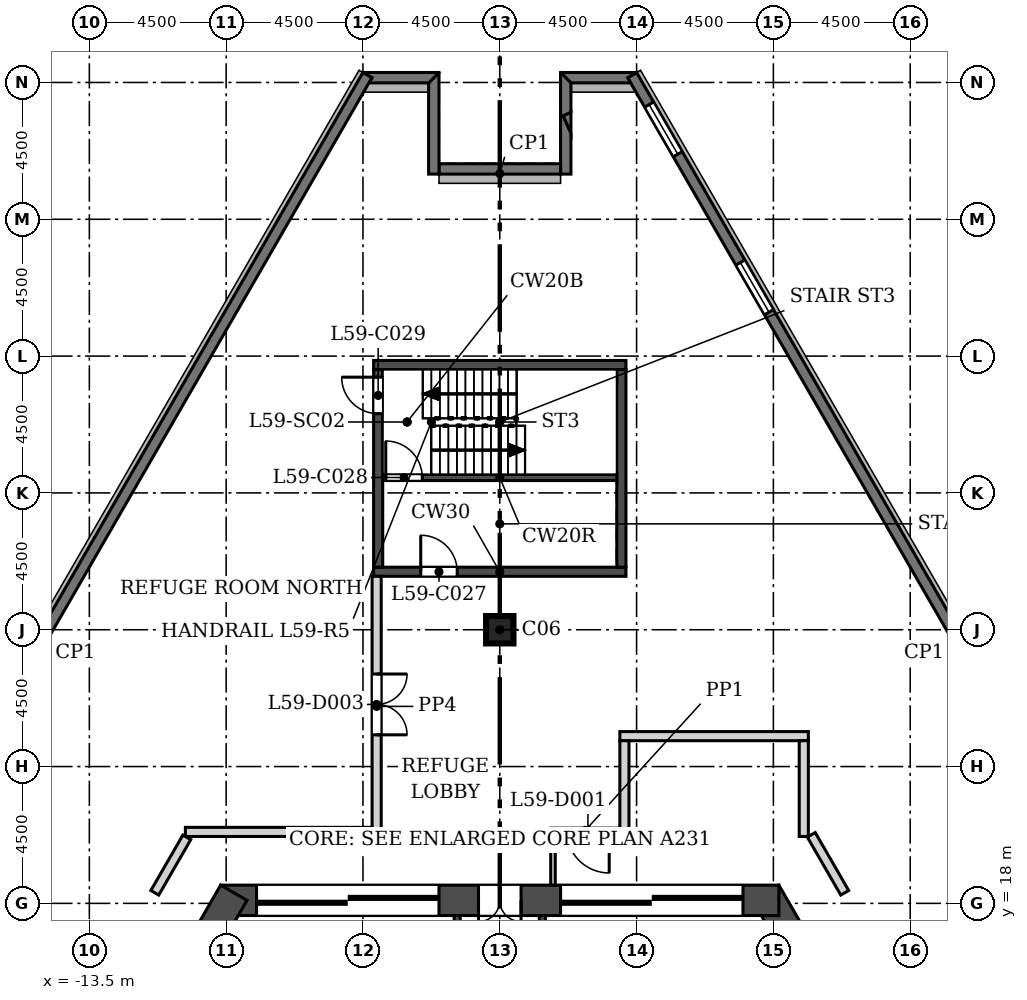
"""IFC4 building model, lengths in metres.
Left out: names, types, materials, properties, quantities, classifications, styles, units other than length and angle.
Written with IfcOpenShell. Run it as: python <this file> out.ifc"""

import sys

from ifc_helpers import new_model, si_unit, direction, frame, frame_2d, origin, origin_2d, place, context, subcontext, project, spatial, polyline, rectangle, outline, extrude, element, fill, save


model = new_model("IFC4")
c1 = context("Model", 3, precision=1e-05, world=origin(), true_north=direction((0.0, 1.0)))
c2 = subcontext(c1, "Body", "Model", "MODEL_VIEW")
j1 = project(units=[si_unit("LENGTHUNIT", "METRE"), si_unit("PLANEANGLEUNIT", "RADIAN")], contexts=[c1])
p1 = place(None, origin())
s1 = spatial("IfcSite", under=j1, at=p1, CompositionType="ELEMENT")
p2 = place(p1, origin())
s2 = spatial("IfcBuilding", under=s1, at=p2, CompositionType="ELEMENT")
p3 = place(p2, frame((0.0, 0.0, 259.5)))
s3 = spatial("IfcBuildingStorey", under=s2, at=p3, CompositionType="ELEMENT", Elevation=259.5)
p4 = place(p3, frame((0.0, 27.0, 0.0), z_axis=(0.0, 0.0, 1.0), x_axis=(1.0, 0.0, 0.0)))
e1 = element("IfcColumn", 1, at=p4, inside=s3, PredefinedType="COLUMN", context=c2, shape_type="SweptSolid", body=[
    extrude(rectangle(XDim=0.9, YDim=0.9, at=origin_2d()), origin(), (0.0, 0.0, 1.0), 7.2),
])
p5 = place(p3, frame((13.167, 10.695, 0.0), z_axis=(0.0, 0.0, 1.0), x_axis=(-0.499995021168, 0.866028278295, 0.0)))
e2 = element("IfcWall", 2, at=p5, inside=s3, PredefinedType="SHEAR", context=c2, shape_type="SweptSolid", body=[
    extrude(rectangle(XDim=8.839, YDim=1.0, at=frame_2d((4.419, 0.0))), origin(), (0.0, 0.0, 1.0), 7.2),
])
p6 = place(p3, frame((9.181, 18.1, 0.0), z_axis=(0.0, 0.0, 1.0), x_axis=(-1.0, 0.0, 0.0)))
e3 = element("IfcWall", 3, at=p6, inside=s3, PredefinedType="SHEAR", context=c2, shape_type="SweptSolid", body=[
    extrude(rectangle(XDim=18.361, YDim=1.0, at=frame_2d((9.181, 0.0))), origin(), (0.0, 0.0, 1.0), 7.2),
])
p7 = place(p6, frame((8.481, 0.0, 0.0)))
e4 = element("IfcOpeningElement", 4, at=p7, cuts=e3, PredefinedType="OPENING", context=c2, shape_type="SweptSolid", body=[
    extrude(rectangle(XDim=1.4, YDim=2.1, at=frame_2d((0.7, 1.05))), frame((0.0, 0.51, 0.0), z_axis=(0.0, -1.0, 0.0), x_axis=(1.0, 0.0, 0.0)), (0.0, 0.0, 1.0), 1.02),
])
p8 = place(p6, frame((11.181, 0.0, 0.0)))
e5 = element("IfcOpeningElement", 5, at=p8, cuts=e3, PredefinedType="OPENING", context=c2, shape_type="SweptSolid", body=[
    extrude(rectangle(XDim=6.0, YDim=2.4, at=frame_2d((3.0, 1.2))), frame((0.0, 0.51, 0.0), z_axis=(0.0, -1.0, 0.0), x_axis=(1.0, 0.0, 0.0)), (0.0, 0.0, 1.0), 1.02),
])
p9 = place(p6, frame((1.181, 0.0, 0.0)))
e6 = element("IfcOpeningElement", 6, at=p9, cuts=e3, PredefinedType="OPENING", context=c2, shape_type="SweptSolid", body=[
    extrude(rectangle(XDim=6.0, YDim=2.4, at=frame_2d((3.0, 1.2))), frame((0.0, 0.51, 0.0), z_axis=(0.0, -1.0, 0.0), x_axis=(1.0, 0.0, 0.0)), (0.0, 0.0, 1.0), 1.02),
])
p10 = place(p3, frame((-8.748, 18.35, 0.0), z_axis=(0.0, 0.0, 1.0), x_axis=(-0.499995021168, -0.866028278295, 0.0)))
e7 = element("IfcWall", 7, at=p10, inside=s3, PredefinedType="SHEAR", context=c2, shape_type="SweptSolid", body=[
    extrude(rectangle(XDim=8.839, YDim=1.0, at=frame_2d((4.419, 0.0))), origin(), (0.0, 0.0, 1.0), 7.2),
])
p11 = place(p3, frame((26.022, 7.709, 0.0), z_axis=(0.0, 0.0, 1.0), x_axis=(-0.500000891752, 0.866024888931, 0.0)))
e8 = element("IfcWall", 8, at=p11, inside=s3, PredefinedType="SOLIDWALL", context=c2, shape_type="SweptSolid", body=[
    extrude(rectangle(XDim=43.339, YDim=0.34, at=frame_2d((21.669, 0.0))), origin(), (0.0, 0.0, 1.0), 6.8),
])
p12 = place(p11, frame((19.335, 0.0, 0.9)))
e9 = element("IfcOpeningElement", 9, at=p12, cuts=e8, PredefinedType="OPENING", context=c2, shape_type="SweptSolid", body=[
    extrude(rectangle(XDim=1.885, YDim=3.0, at=frame_2d((0.942, 1.5))), frame((0.0, 0.18, 0.0), z_axis=(0.0, -1.0, 0.0), x_axis=(1.0, 0.0, 0.0)), (0.0, 0.0, 1.0), 0.36),
])
p13 = place(p11, frame((34.335, 0.0, 0.9)))
e10 = element("IfcOpeningElement", 10, at=p13, cuts=e8, PredefinedType="OPENING", context=c2, shape_type="SweptSolid", body=[
    extrude(rectangle(XDim=1.885, YDim=3.0, at=frame_2d((0.942, 1.5))), frame((0.0, 0.18, 0.0), z_axis=(0.0, -1.0, 0.0), x_axis=(1.0, 0.0, 0.0)), (0.0, 0.0, 1.0), 0.36),
])
p14 = place(p11, frame((40.335, 0.0, 0.9)))
e11 = element("IfcOpeningElement", 11, at=p14, cuts=e8, PredefinedType="OPENING", context=c2, shape_type="SweptSolid", body=[
    extrude(rectangle(XDim=1.885, YDim=3.0, at=frame_2d((0.942, 1.5))), frame((0.0, 0.18, 0.0), z_axis=(0.0, -1.0, 0.0), x_axis=(1.0, 0.0, 0.0)), (0.0, 0.0, 1.0), 0.36),
])
p15 = place(p3, origin())
e12 = element("IfcWall", 12, at=p15, inside=s3, PredefinedType="SOLIDWALL", context=c2, shape_type="SweptSolid", body=[
    extrude(outline(polyline([(1.999, 45.327), (4.501, 45.327), (4.501, 45.327), (4.206, 45.156), (4.305, 44.986), (2.34, 44.986), (1.999, 45.327), (1.999, 45.327)])), origin(), (0.0, 0.0, 1.0), 6.8),
])
p16 = place(p3, origin())
e13 = element("IfcWall", 13, at=p16, inside=s3, PredefinedType="SOLIDWALL", context=c2, shape_type="SweptSolid", body=[
    extrude(outline(polyline([(2.341, 43.327), (2.078, 43.902), (2.341, 44.021), (2.341, 43.327)])), origin(), (0.0, 0.0, 1.0), 6.0),
])
p17 = place(p3, origin())
e14 = element("IfcWall", 14, at=p17, inside=s3, PredefinedType="SOLIDWALL", context=c2, shape_type="SweptSolid", body=[
    extrude(outline(polyline([(2.0, 41.986), (2.0, 45.328), (2.0, 45.328), (2.341, 44.987), (2.341, 44.021), (2.078, 43.902), (2.341, 43.327), (2.341, 41.986), (2.0, 41.986)])), origin(), (0.0, 0.0, 1.0), 6.8),
])
p18 = place(p3, frame((2.0, 42.157, 0.0), z_axis=(0.0, 0.0, 1.0), x_axis=(-1.0, 0.0, 0.0)))
e15 = element("IfcWall", 15, at=p18, inside=s3, PredefinedType="SOLIDWALL", context=c2, shape_type="SweptSolid", body=[
    extrude(rectangle(XDim=4.0, YDim=0.34, at=frame_2d((2.0, 0.0))), origin(), (0.0, 0.0, 1.0), 6.8),
])
p19 = place(p3, origin())
e16 = element("IfcWall", 16, at=p19, inside=s3, PredefinedType="SOLIDWALL", context=c2, shape_type="SweptSolid", body=[
    extrude(outline(polyline([(-2.0, 45.328), (-2.0, 41.986), (-2.341, 41.986), (-2.341, 44.987), (-2.0, 45.328), (-2.0, 45.328)])), origin(), (0.0, 0.0, 1.0), 6.8),
])
p20 = place(p3, origin())
e17 = element("IfcWall", 17, at=p20, inside=s3, PredefinedType="SOLIDWALL", context=c2, shape_type="SweptSolid", body=[
    extrude(outline(polyline([(-4.305, 44.986), (-4.206, 45.156), (-4.501, 45.327), (-4.501, 45.327), (-1.999, 45.327), (-1.999, 45.327), (-2.34, 44.986), (-4.305, 44.986)])), origin(), (0.0, 0.0, 1.0), 6.8),
])
p21 = place(p3, frame((-4.353, 45.242, 0.0), z_axis=(0.0, 0.0, 1.0), x_axis=(-0.500000891752, -0.866024888931, 0.0)))
e18 = element("IfcWall", 18, at=p21, inside=s3, PredefinedType="SOLIDWALL", context=c2, shape_type="SweptSolid", body=[
    extrude(rectangle(XDim=43.339, YDim=0.34, at=frame_2d((21.669, 0.0))), origin(), (0.0, 0.0, 1.0), 6.8),
])
p22 = place(p3, frame((-1.4, 5.85, -0.4), z_axis=(0.0, 0.0, 1.0), x_axis=(0.0, 1.0, 0.0)))
e19 = element("IfcWall", 19, at=p22, inside=s3, PredefinedType="SOLIDWALL", context=c2, shape_type="SweptSolid", body=[
    extrude(rectangle(XDim=11.75, YDim=0.2, at=frame_2d((5.875, 0.0))), origin(), (0.0, 0.0, 1.0), 7.2),
])
p23 = place(p22, frame((0.65, 0.0, 0.4)))
e20 = element("IfcOpeningElement", 20, at=p23, cuts=e19, PredefinedType="OPENING", context=c2, shape_type="SweptSolid", body=[
    extrude(rectangle(XDim=1.1, YDim=2.1, at=frame_2d((0.55, 1.05))), frame((0.0, 0.11, 0.0), z_axis=(0.0, -1.0, 0.0), x_axis=(1.0, 0.0, 0.0)), (0.0, 0.0, 1.0), 0.22),
])
p24 = place(p22, frame((3.3, 0.0, 0.4)))
e21 = element("IfcOpeningElement", 21, at=p24, cuts=e19, PredefinedType="OPENING", context=c2, shape_type="SweptSolid", body=[
    extrude(rectangle(XDim=1.0, YDim=2.1, at=frame_2d((0.5, 1.05))), frame((0.0, 0.11, 0.0), z_axis=(0.0, -1.0, 0.0), x_axis=(1.0, 0.0, 0.0)), (0.0, 0.0, 1.0), 0.22),
])
p25 = place(p22, frame((7.2, 0.0, 0.4)))
e22 = element("IfcOpeningElement", 22, at=p25, cuts=e19, PredefinedType="OPENING", context=c2, shape_type="SweptSolid", body=[
    extrude(rectangle(XDim=1.0, YDim=2.1, at=frame_2d((0.5, 1.05))), frame((0.0, 0.11, 0.0), z_axis=(0.0, -1.0, 0.0), x_axis=(1.0, 0.0, 0.0)), (0.0, 0.0, 1.0), 0.22),
])
p26 = place(p3, frame((1.4, 5.85, -0.4), z_axis=(0.0, 0.0, 1.0), x_axis=(0.0, 1.0, 0.0)))
e23 = element("IfcWall", 23, at=p26, inside=s3, PredefinedType="SOLIDWALL", context=c2, shape_type="SweptSolid", body=[
    extrude(rectangle(XDim=11.75, YDim=0.2, at=frame_2d((5.875, 0.0))), origin(), (0.0, 0.0, 1.0), 7.2),
])
p27 = place(p26, frame((3.2, 0.0, 0.4)))
e24 = element("IfcOpeningElement", 24, at=p27, cuts=e23, PredefinedType="OPENING", context=c2, shape_type="SweptSolid", body=[
    extrude(rectangle(XDim=1.2, YDim=2.1, at=frame_2d((0.6, 1.05))), frame((0.0, 0.11, 0.0), z_axis=(0.0, -1.0, 0.0), x_axis=(1.0, 0.0, 0.0)), (0.0, 0.0, 1.0), 0.22),
])
p28 = place(p26, frame((0.65, 0.0, 0.4)))
e25 = element("IfcOpeningElement", 25, at=p28, cuts=e23, PredefinedType="OPENING", context=c2, shape_type="SweptSolid", body=[
    extrude(rectangle(XDim=1.1, YDim=2.1, at=frame_2d((0.55, 1.05))), frame((0.0, 0.11, 0.0), z_axis=(0.0, -1.0, 0.0), x_axis=(1.0, 0.0, 0.0)), (0.0, 0.0, 1.0), 0.22),
])
p29 = place(p26, frame((5.9, 0.0, 0.4)))
e26 = element("IfcOpeningElement", 26, at=p29, cuts=e23, PredefinedType="OPENING", context=c2, shape_type="SweptSolid", body=[
    extrude(rectangle(XDim=1.0, YDim=2.1, at=frame_2d((0.5, 1.05))), frame((0.0, 0.11, 0.0), z_axis=(0.0, -1.0, 0.0), x_axis=(1.0, 0.0, 0.0)), (0.0, 0.0, 1.0), 0.22),
])
p30 = place(p3, frame((-4.15, 28.907, -0.4), z_axis=(0.0, 0.0, 1.0), x_axis=(1.0, 0.0, 0.0)))
e27 = element("IfcWall", 27, at=p30, inside=s3, PredefinedType="SOLIDWALL", context=c2, shape_type="SweptSolid", body=[
    extrude(rectangle(XDim=8.3, YDim=0.3, at=frame_2d((4.15, 0.0))), origin(), (0.0, 0.0, 1.0), 7.2),
])
p31 = place(p30, frame((1.55, 0.0, 0.4)))
e28 = element("IfcOpeningElement", 28, at=p31, cuts=e27, PredefinedType="OPENING", context=c2, shape_type="SweptSolid", body=[
    extrude(rectangle(XDim=1.2, YDim=2.1, at=frame_2d((0.6, 1.05))), frame((0.0, 0.16, 0.0), z_axis=(0.0, -1.0, 0.0), x_axis=(1.0, 0.0, 0.0)), (0.0, 0.0, 1.0), 0.32),
])
p32 = place(p3, frame((-4.15, 35.707, -0.4), z_axis=(0.0, 0.0, 1.0), x_axis=(1.0, 0.0, 0.0)))
e29 = element("IfcWall", 29, at=p32, inside=s3, PredefinedType="SOLIDWALL", context=c2, shape_type="SweptSolid", body=[
    extrude(rectangle(XDim=8.3, YDim=0.3, at=frame_2d((4.15, 0.0))), origin(), (0.0, 0.0, 1.0), 7.2),
])
p33 = place(p3, frame((-4.0, 29.057, -0.4), z_axis=(0.0, 0.0, 1.0), x_axis=(0.0, 1.0, 0.0)))
e30 = element("IfcWall", 30, at=p33, inside=s3, PredefinedType="SOLIDWALL", context=c2, shape_type="SweptSolid", body=[
    extrude(rectangle(XDim=6.5, YDim=0.3, at=frame_2d((3.25, 0.0))), origin(), (0.0, 0.0, 1.0), 7.2),
])
p34 = place(p33, frame((5.05, 0.0, 0.4)))
e31 = element("IfcOpeningElement", 31, at=p34, cuts=e30, PredefinedType="OPENING", context=c2, shape_type="SweptSolid", body=[
    extrude(rectangle(XDim=1.2, YDim=2.1, at=frame_2d((0.6, 1.05))), frame((0.0, 0.16, 0.0), z_axis=(0.0, -1.0, 0.0), x_axis=(1.0, 0.0, 0.0)), (0.0, 0.0, 1.0), 0.32),
])
p35 = place(p3, frame((4.0, 29.057, -0.4), z_axis=(0.0, 0.0, 1.0), x_axis=(0.0, 1.0, 0.0)))
e32 = element("IfcWall", 32, at=p35, inside=s3, PredefinedType="SOLIDWALL", context=c2, shape_type="SweptSolid", body=[
    extrude(rectangle(XDim=6.5, YDim=0.3, at=frame_2d((3.25, 0.0))), origin(), (0.0, 0.0, 1.0), 7.2),
])
p36 = place(p3, frame((-3.85, 32.007, -0.4), z_axis=(0.0, 0.0, 1.0), x_axis=(1.0, 0.0, 0.0)))
e33 = element("IfcWall", 33, at=p36, inside=s3, PredefinedType="SOLIDWALL", context=c2, shape_type="SweptSolid", body=[
    extrude(rectangle(XDim=7.7, YDim=0.2, at=frame_2d((3.85, 0.0))), origin(), (0.0, 0.0, 1.0), 7.2),
])
p37 = place(p36, frame((0.1, 0.0, 0.4)))
e34 = element("IfcOpeningElement", 34, at=p37, cuts=e33, PredefinedType="OPENING", context=c2, shape_type="SweptSolid", body=[
    extrude(rectangle(XDim=1.2, YDim=2.1, at=frame_2d((0.6, 1.05))), frame((0.0, 0.11, 0.0), z_axis=(0.0, -1.0, 0.0), x_axis=(1.0, 0.0, 0.0)), (0.0, 0.0, 1.0), 0.22),
])
p38 = place(p3, frame((-3.85, 33.832, 0.0), z_axis=(0.0, 0.0, 1.0), x_axis=(1.0, 0.0, 0.0)))
e35 = element("IfcWall", 35, at=p38, inside=s3, PredefinedType="SOLIDWALL", context=c2, shape_type="SweptSolid", body=[
    extrude(rectangle(XDim=1.6, YDim=0.2, at=frame_2d((0.8, 0.0))), origin(), (0.0, 0.0, 1.0), 6.8),
])
p39 = place(p3, frame((-4.05, 20.2, 0.0), z_axis=(0.0, 0.0, 1.0), x_axis=(0.0, 1.0, 0.0)))
e36 = element("IfcWall", 36, at=p39, inside=s3, PredefinedType="SOLIDWALL", context=c2, shape_type="SweptSolid", body=[
    extrude(rectangle(XDim=8.557, YDim=0.3, at=frame_2d((4.279, 0.0))), origin(), (0.0, 0.0, 1.0), 6.8),
])
p40 = place(p39, frame((3.344, 0.0, 0.0)))
e37 = element("IfcOpeningElement", 37, at=p40, cuts=e36, PredefinedType="OPENING", context=c2, shape_type="SweptSolid", body=[
    extrude(rectangle(XDim=2.0, YDim=2.1, at=frame_2d((1.0, 1.05))), frame((0.0, 0.16, 0.0), z_axis=(0.0, -1.0, 0.0), x_axis=(1.0, 0.0, 0.0)), (0.0, 0.0, 1.0), 0.32),
])
p41 = place(p3, frame((3.95, 23.5, 0.0), z_axis=(0.0, 0.0, 1.0), x_axis=(1.0, 0.0, 0.0)))
e38 = element("IfcWall", 38, at=p41, inside=s3, PredefinedType="SOLIDWALL", context=c2, shape_type="SweptSolid", body=[
    extrude(rectangle(XDim=6.2, YDim=0.3, at=frame_2d((3.1, 0.0))), origin(), (0.0, 0.0, 1.0), 6.8),
])
p42 = place(p3, frame((-10.341, 20.35, 0.0), z_axis=(0.0, 0.0, 1.0), x_axis=(1.0, 0.0, 0.0)))
e39 = element("IfcWall", 39, at=p42, inside=s3, PredefinedType="SOLIDWALL", context=c2, shape_type="SweptSolid", body=[
    extrude(rectangle(XDim=6.141, YDim=0.3, at=frame_2d((3.071, 0.0))), origin(), (0.0, 0.0, 1.0), 6.8),
])
p43 = place(p3, frame((4.1, 20.2, 0.0), z_axis=(0.0, 0.0, 1.0), x_axis=(7.7513371e-05, 0.999999996996, 0.0)))
e40 = element("IfcWall", 40, at=p43, inside=s3, PredefinedType="SOLIDWALL", context=c2, shape_type="SweptSolid", body=[
    extrude(rectangle(XDim=3.15, YDim=0.3, at=frame_2d((1.575, 0.0))), origin(), (0.0, 0.0, 1.0), 6.8),
])
p44 = place(p3, frame((10.0, 23.35, 0.0), z_axis=(0.0, 0.0, 1.0), x_axis=(0.0, -1.0, 0.0)))
e41 = element("IfcWall", 41, at=p44, inside=s3, PredefinedType="SOLIDWALL", context=c2, shape_type="SweptSolid", body=[
    extrude(rectangle(XDim=3.149, YDim=0.3, at=frame_2d((1.575, 0.0))), origin(), (0.0, 0.0, 1.0), 6.8),
])
p45 = place(p3, frame((1.675, 20.4, 0.0), z_axis=(0.0, 0.0, 1.0), x_axis=(1.0, 0.0, 0.0)))
e42 = element("IfcWall", 42, at=p45, inside=s3, PredefinedType="PARTITIONING", context=c2, shape_type="SweptSolid", body=[
    extrude(rectangle(XDim=2.275, YDim=0.15, at=frame_2d((1.137, 0.0))), origin(), (0.0, 0.0, 1.0), 6.8),
])
p46 = place(p45, frame((0.524, 0.0, 0.0)))
e43 = element("IfcOpeningElement", 43, at=p46, cuts=e42, PredefinedType="OPENING", context=c2, shape_type="SweptSolid", body=[
    extrude(rectangle(XDim=1.4, YDim=2.1, at=frame_2d((0.7, 1.05))), frame((0.0, 0.085, 0.0), z_axis=(0.0, -1.0, 0.0), x_axis=(1.0, 0.0, 0.0)), (0.0, 0.0, 1.0), 0.17),
])
p47 = place(p3, frame((10.246, 20.255, 0.0), z_axis=(0.0, 0.0, 1.0), x_axis=(0.500026363189, -0.866010182455, 0.0)))
e44 = element("IfcWall", 44, at=p47, inside=s3, PredefinedType="SOLIDWALL", context=c2, shape_type="SweptSolid", body=[
    extrude(rectangle(XDim=2.202, YDim=0.3, at=frame_2d((1.101, 0.0))), origin(), (0.0, 0.0, 1.0), 6.8),
])
p48 = place(p3, frame((-11.347, 18.348, 0.0), z_axis=(0.0, 0.0, 1.0), x_axis=(0.500026652407, 0.866010015463, 0.0)))
e45 = element("IfcWall", 45, at=p48, inside=s3, PredefinedType="SOLIDWALL", context=c2, shape_type="SweptSolid", body=[
    extrude(rectangle(XDim=2.107, YDim=0.3, at=frame_2d((1.054, 0.0))), origin(), (0.0, 0.0, 1.0), 6.8),
])
p49 = place(p3, frame((1.75, 18.6, 0.0), z_axis=(0.0, 0.0, 1.0), x_axis=(0.0, 1.0, 0.0)))
e46 = element("IfcWall", 46, at=p49, inside=s3, PredefinedType="PARTITIONING", context=c2, shape_type="SweptSolid", body=[
    extrude(rectangle(XDim=1.725, YDim=0.15, at=frame_2d((0.862, 0.0))), origin(), (0.0, 0.0, 1.0), 6.8),
])
p50 = place(p13, origin())
e47 = element("IfcWindow", 47, at=p50, inside=s3, PartitioningType="SINGLE_PANEL", PredefinedType="WINDOW", context=c2, shape_type="SweptSolid", body=[
    extrude(rectangle(XDim=1.885, YDim=3.0, at=frame_2d((0.942, 1.5))), frame((0.0, 0.11, 0.0), z_axis=(0.0, -1.0, 0.0), x_axis=(1.0, 0.0, 0.0)), (0.0, 0.0, 1.0), 0.06),
])
fill(e10, e47)
p51 = place(p14, origin())
e48 = element("IfcWindow", 48, at=p51, inside=s3, PartitioningType="SINGLE_PANEL", PredefinedType="WINDOW", context=c2, shape_type="SweptSolid", body=[
    extrude(rectangle(XDim=1.885, YDim=3.0, at=frame_2d((0.942, 1.5))), frame((0.0, 0.11, 0.0), z_axis=(0.0, -1.0, 0.0), x_axis=(1.0, 0.0, 0.0)), (0.0, 0.0, 1.0), 0.06),
])
fill(e11, e48)
p52 = place(p7, origin())
e49 = element("IfcDoor", 49, at=p52, inside=s3, OperationType="DOUBLE_DOOR_SINGLE_SWING", PredefinedType="DOOR", context=c2, shape_type="SweptSolid", body=[
    extrude(rectangle(XDim=1.4, YDim=2.1, at=frame_2d((0.7, 1.05))), frame((0.0, 0.025, 0.0), z_axis=(0.0, -1.0, 0.0), x_axis=(1.0, 0.0, 0.0)), (0.0, 0.0, 1.0), 0.05),
])
fill(e4, e49)
p53 = place(p8, origin())
e50 = element("IfcDoor", 50, at=p53, inside=s3, OperationType="DOUBLE_DOOR_SLIDING", PredefinedType="DOOR", context=c2, shape_type="SweptSolid", body=[
    extrude(rectangle(XDim=6.0, YDim=2.4, at=frame_2d((3.0, 1.2))), frame((0.0, 0.025, 0.0), z_axis=(0.0, -1.0, 0.0), x_axis=(1.0, 0.0, 0.0)), (0.0, 0.0, 1.0), 0.05),
])
fill(e5, e50)
p54 = place(p9, origin())
e51 = element("IfcDoor", 51, at=p54, inside=s3, OperationType="DOUBLE_DOOR_SLIDING", PredefinedType="DOOR", context=c2, shape_type="SweptSolid", body=[
    extrude(rectangle(XDim=6.0, YDim=2.4, at=frame_2d((3.0, 1.2))), frame((0.0, 0.025, 0.0), z_axis=(0.0, -1.0, 0.0), x_axis=(1.0, 0.0, 0.0)), (0.0, 0.0, 1.0), 0.05),
])
fill(e6, e51)
p55 = place(p31, origin())
e52 = element("IfcDoor", 52, at=p55, inside=s3, OperationType="SINGLE_SWING_LEFT", PredefinedType="DOOR", context=c2, shape_type="SweptSolid", body=[
    extrude(rectangle(XDim=1.2, YDim=2.1, at=frame_2d((0.6, 1.05))), frame((0.0, 0.025, 0.0), z_axis=(0.0, -1.0, 0.0), x_axis=(1.0, 0.0, 0.0)), (0.0, 0.0, 1.0), 0.05),
])
fill(e28, e52)
p56 = place(p37, origin())
e53 = element("IfcDoor", 53, at=p56, inside=s3, OperationType="SINGLE_SWING_LEFT", PredefinedType="DOOR", context=c2, shape_type="SweptSolid", body=[
    extrude(rectangle(XDim=1.2, YDim=2.1, at=frame_2d((0.6, 1.05))), frame((0.0, 0.025, 0.0), z_axis=(0.0, -1.0, 0.0), x_axis=(1.0, 0.0, 0.0)), (0.0, 0.0, 1.0), 0.05),
])
fill(e34, e53)
p57 = place(p34, origin())
e54 = element("IfcDoor", 54, at=p57, inside=s3, OperationType="SINGLE_SWING_RIGHT", PredefinedType="DOOR", context=c2, shape_type="SweptSolid", body=[
    extrude(rectangle(XDim=1.2, YDim=2.1, at=frame_2d((0.6, 1.05))), frame((0.0, 0.025, 0.0), z_axis=(0.0, -1.0, 0.0), x_axis=(1.0, 0.0, 0.0)), (0.0, 0.0, 1.0), 0.05),
])
fill(e31, e54)
p58 = place(p46, frame((1.4, 0.0, 0.0), z_axis=(0.0, 0.0, 1.0), x_axis=(-1.0, 0.0, 0.0)))
e55 = element("IfcDoor", 55, at=p58, inside=s3, OperationType="SINGLE_SWING_LEFT", PredefinedType="DOOR", context=c2, shape_type="SweptSolid", body=[
    extrude(rectangle(XDim=1.4, YDim=2.1, at=frame_2d((0.7, 1.05))), frame((0.0, 0.025, 0.0), z_axis=(0.0, -1.0, 0.0), x_axis=(1.0, 0.0, 0.0)), (0.0, 0.0, 1.0), 0.05),
])
fill(e43, e55)
p59 = place(p40, frame((2.0, 0.0, 0.0), z_axis=(0.0, 0.0, 1.0), x_axis=(-1.0, 0.0, 0.0)))
e56 = element("IfcDoor", 56, at=p59, inside=s3, OperationType="DOUBLE_DOOR_SINGLE_SWING", PredefinedType="DOOR", context=c2, shape_type="SweptSolid", body=[
    extrude(rectangle(XDim=2.0, YDim=2.1, at=frame_2d((1.0, 1.05))), frame((0.0, 0.025, 0.0), z_axis=(0.0, -1.0, 0.0), x_axis=(1.0, 0.0, 0.0)), (0.0, 0.0, 1.0), 0.05),
])
fill(e37, e56)
save(model, sys.argv[1])
